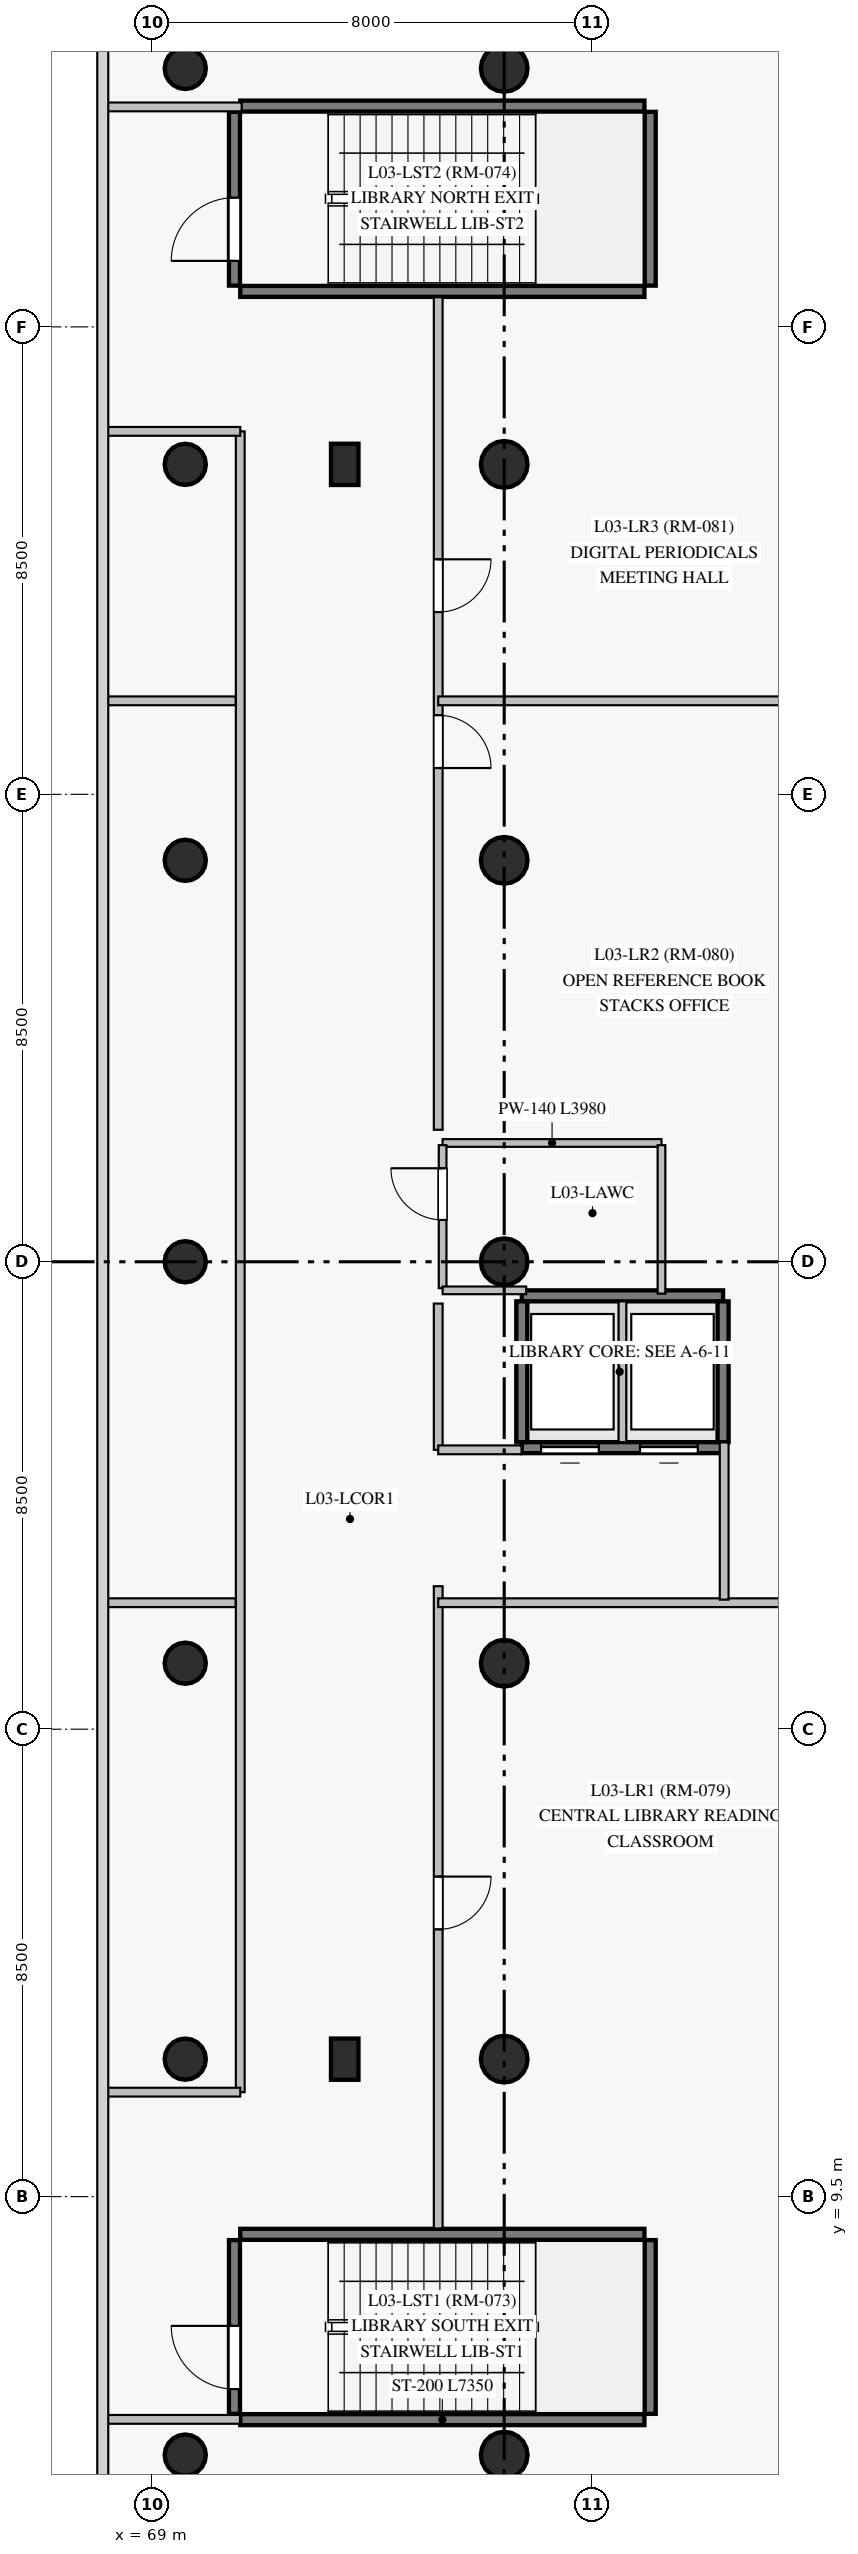
"""IFC4 building model, lengths in metres.
Left out: names, types, materials, properties, quantities, classifications, styles, units other than length and angle.
Written with IfcOpenShell. Run it as: python <this file> out.ifc"""

import sys

from ifc_helpers import new_model, si_unit, direction, frame, frame_2d, origin, origin_with_axes, origin_2d, place, context, subcontext, project, spatial, rectangle, circle, extrude, source, transform, mapped, element, fill, save


model = new_model("IFC4")
c1 = context("Model", 3, precision=1e-05, world=origin(), true_north=direction((0.0, 1.0)))
c2 = subcontext(c1, "Body", "Model", "MODEL_VIEW")
j1 = project(units=[si_unit("LENGTHUNIT", "METRE"), si_unit("PLANEANGLEUNIT", "RADIAN")], contexts=[c1])
p1 = place(None, origin())
s1 = spatial("IfcSite", under=j1, at=p1, CompositionType="ELEMENT")
p2 = place(p1, origin())
s2 = spatial("IfcBuilding", under=s1, at=p2, CompositionType="ELEMENT")
p3 = place(p2, frame((0.0, 0.0, 13.5)))
s3 = spatial("IfcBuildingStorey", under=s2, at=p3, CompositionType="ELEMENT", Elevation=13.5)
m1 = source(origin_with_axes(), c2, "Body", "SweptSolid", [
    extrude(circle(Radius=0.375, at=origin_2d()), origin(), (0.0, 0.0, 1.0), 4.5),
])
for number, where, z_axis, x_axis in (
    (1, (69.6, 4.8, 0.0), (0.0, 0.0, 1.0), (1.0, 0.0, 0.0)),
    (2, (69.6, 12.0, 0.0), (0.0, 0.0, 1.0), (1.0, 0.0, 0.0)),
    (3, (69.6, 19.2, 0.0), (0.0, 0.0, 1.0), (1.0, 0.0, 0.0)),
    (4, (69.6, 26.5, 0.0), (0.0, 0.0, 1.0), (1.0, 0.0, 0.0)),
    (5, (69.6, 33.8, 0.0), (0.0, 0.0, 1.0), (1.0, 0.0, 0.0)),
    (6, (69.6, 41.0, 0.0), (0.0, 0.0, 1.0), (1.0, 0.0, 0.0)),
    (7, (69.6, 48.2, 0.0), (0.0, 0.0, 1.0), (1.0, 0.0, 0.0)),
):
    element("IfcColumn", number, at=place(p3, frame(where, z_axis=z_axis, x_axis=x_axis)), inside=s3, PredefinedType="COLUMN", context=c2, shape_type="MappedRepresentation", body=[
        mapped(m1, transform((0.0, 0.0, 0.0), scale=1.0)),
    ])
m2 = source(origin_with_axes(), c2, "Body", "SweptSolid", [
    extrude(circle(Radius=0.425, at=origin_2d()), origin(), (0.0, 0.0, 1.0), 4.5),
])
for number, where, z_axis, x_axis in (
    (8, (75.4, 4.8, 0.0), (0.0, 0.0, 1.0), (1.0, 0.0, 0.0)),
    (9, (75.4, 12.0, 0.0), (0.0, 0.0, 1.0), (1.0, 0.0, 0.0)),
    (10, (75.4, 19.2, 0.0), (0.0, 0.0, 1.0), (1.0, 0.0, 0.0)),
    (11, (75.4, 26.5, 0.0), (0.0, 0.0, 1.0), (1.0, 0.0, 0.0)),
    (12, (75.4, 33.8, 0.0), (0.0, 0.0, 1.0), (1.0, 0.0, 0.0)),
    (13, (75.4, 41.0, 0.0), (0.0, 0.0, 1.0), (1.0, 0.0, 0.0)),
    (14, (75.4, 48.2, 0.0), (0.0, 0.0, 1.0), (1.0, 0.0, 0.0)),
):
    element("IfcColumn", number, at=place(p3, frame(where, z_axis=z_axis, x_axis=x_axis)), inside=s3, PredefinedType="COLUMN", context=c2, shape_type="MappedRepresentation", body=[
        mapped(m2, transform((0.0, 0.0, 0.0), scale=1.0)),
    ])
m3 = source(origin_with_axes(), c2, "Body", "SweptSolid", [
    extrude(rectangle(XDim=0.5, YDim=0.75, at=origin_2d()), origin(), (0.0, 0.0, 1.0), 4.5),
])
for number, where, z_axis, x_axis in (
    (15, (72.5, 12.0, 0.0), (0.0, 0.0, 1.0), (1.0, 0.0, 0.0)),
    (16, (72.5, 41.0, 0.0), (0.0, 0.0, 1.0), (1.0, 0.0, 0.0)),
):
    element("IfcColumn", number, at=place(p3, frame(where, z_axis=z_axis, x_axis=x_axis)), inside=s3, PredefinedType="PILASTER", context=c2, shape_type="MappedRepresentation", body=[
        mapped(m3, transform((0.0, 0.0, 0.0), scale=1.0)),
    ])
for number, where, z_axis, x_axis in (
    (17, (70.6, 5.445, 0.0), (0.0, 0.0, 1.0), (1.0, 0.0, 0.0)),
    (18, (70.6, 8.815, 0.0), (0.0, 0.0, 1.0), (1.0, 0.0, 0.0)),
    (19, (70.6, 44.145, 0.0), (0.0, 0.0, 1.0), (1.0, 0.0, 0.0)),
    (20, (70.6, 47.515, 0.0), (0.0, 0.0, 1.0), (1.0, 0.0, 0.0)),
):
    element("IfcWall", number, at=place(p3, frame(where, z_axis=z_axis, x_axis=x_axis)), inside=s3, PredefinedType="SHEAR", context=c2, shape_type="SweptSolid", body=[
        extrude(rectangle(XDim=7.35, YDim=0.2, at=frame_2d((3.675, 0.0))), origin(), (0.0, 0.0, 1.0), 4.225),
    ])
p4 = place(p3, frame((75.72, 23.12, 0.0), z_axis=(0.0, 0.0, 1.0), x_axis=(1.0, 0.0, 0.0)))
e21 = element("IfcWall", 21, at=p4, inside=s3, PredefinedType="SHEAR", context=c2, shape_type="SweptSolid", body=[
    extrude(rectangle(XDim=3.66, YDim=0.2, at=frame_2d((1.83, 0.0))), origin(), (0.0, 0.0, 1.0), 4.225),
])
p5 = place(p4, frame((0.35, 0.0, 0.0)))
e22 = element("IfcOpeningElement", 22, at=p5, cuts=e21, PredefinedType="OPENING", context=c2, shape_type="SweptSolid", body=[
    extrude(rectangle(XDim=1.05, YDim=2.15, at=frame_2d((0.525, 1.075))), frame((0.0, 0.11, 0.0), z_axis=(0.0, -1.0, 0.0), x_axis=(1.0, 0.0, 0.0)), (0.0, 0.0, 1.0), 0.22),
])
p6 = place(p4, frame((2.15, 0.0, 0.0)))
e23 = element("IfcOpeningElement", 23, at=p6, cuts=e21, PredefinedType="OPENING", context=c2, shape_type="SweptSolid", body=[
    extrude(rectangle(XDim=1.05, YDim=2.15, at=frame_2d((0.525, 1.075))), frame((0.0, 0.11, 0.0), z_axis=(0.0, -1.0, 0.0), x_axis=(1.0, 0.0, 0.0)), (0.0, 0.0, 1.0), 0.22),
])
p7 = place(p3, frame((75.72, 25.88, 0.0), z_axis=(0.0, 0.0, 1.0), x_axis=(1.0, 0.0, 0.0)))
e24 = element("IfcWall", 24, at=p7, inside=s3, PredefinedType="SHEAR", context=c2, shape_type="SweptSolid", body=[
    extrude(rectangle(XDim=3.66, YDim=0.2, at=frame_2d((1.83, 0.0))), origin(), (0.0, 0.0, 1.0), 4.225),
])
p8 = place(p3, frame((70.495, 5.55, 0.0), z_axis=(0.0, 0.0, 1.0), x_axis=(0.0, 1.0, 0.0)))
e25 = element("IfcWall", 25, at=p8, inside=s3, PredefinedType="SHEAR", context=c2, shape_type="SweptSolid", body=[
    extrude(rectangle(XDim=3.16, YDim=0.2, at=frame_2d((1.58, 0.0))), origin(), (0.0, 0.0, 1.0), 4.225),
])
p9 = place(p8, frame((0.45, 0.0, 0.0)))
e26 = element("IfcOpeningElement", 26, at=p9, cuts=e25, PredefinedType="OPENING", context=c2, shape_type="SweptSolid", body=[
    extrude(rectangle(XDim=1.15, YDim=2.15, at=frame_2d((0.575, 1.075))), frame((0.0, 0.11, 0.0), z_axis=(0.0, -1.0, 0.0), x_axis=(1.0, 0.0, 0.0)), (0.0, 0.0, 1.0), 0.22),
])
p10 = place(p3, frame((78.055, 5.55, 0.0), z_axis=(0.0, 0.0, 1.0), x_axis=(0.0, 1.0, 0.0)))
e27 = element("IfcWall", 27, at=p10, inside=s3, PredefinedType="SHEAR", context=c2, shape_type="SweptSolid", body=[
    extrude(rectangle(XDim=3.16, YDim=0.2, at=frame_2d((1.58, 0.0))), origin(), (0.0, 0.0, 1.0), 4.225),
])
p11 = place(p3, frame((70.495, 44.25, 0.0), z_axis=(0.0, 0.0, 1.0), x_axis=(0.0, 1.0, 0.0)))
e28 = element("IfcWall", 28, at=p11, inside=s3, PredefinedType="SHEAR", context=c2, shape_type="SweptSolid", body=[
    extrude(rectangle(XDim=3.16, YDim=0.2, at=frame_2d((1.58, 0.0))), origin(), (0.0, 0.0, 1.0), 4.225),
])
p12 = place(p11, frame((0.45, 0.0, 0.0)))
e29 = element("IfcOpeningElement", 29, at=p12, cuts=e28, PredefinedType="OPENING", context=c2, shape_type="SweptSolid", body=[
    extrude(rectangle(XDim=1.15, YDim=2.15, at=frame_2d((0.575, 1.075))), frame((0.0, 0.11, 0.0), z_axis=(0.0, -1.0, 0.0), x_axis=(1.0, 0.0, 0.0)), (0.0, 0.0, 1.0), 0.22),
])
p13 = place(p3, frame((78.055, 44.25, 0.0), z_axis=(0.0, 0.0, 1.0), x_axis=(0.0, 1.0, 0.0)))
e30 = element("IfcWall", 30, at=p13, inside=s3, PredefinedType="SHEAR", context=c2, shape_type="SweptSolid", body=[
    extrude(rectangle(XDim=3.16, YDim=0.2, at=frame_2d((1.58, 0.0))), origin(), (0.0, 0.0, 1.0), 4.225),
])
for number, where, z_axis, x_axis in (
    (31, (75.72, 23.22, 0.0), (0.0, 0.0, 1.0), (0.0, 1.0, 0.0)),
    (32, (79.38, 23.22, 0.0), (0.0, 0.0, 1.0), (0.0, 1.0, 0.0)),
):
    element("IfcWall", number, at=place(p3, frame(where, z_axis=z_axis, x_axis=x_axis)), inside=s3, PredefinedType="SHEAR", context=c2, shape_type="SweptSolid", body=[
        extrude(rectangle(XDim=2.56, YDim=0.2, at=frame_2d((1.28, 0.0))), origin(), (0.0, 0.0, 1.0), 4.225),
    ])
p14 = place(p3, frame((70.6, 11.4, 0.0), z_axis=(0.0, 0.0, 1.0), x_axis=(0.0, 1.0, 0.0)))
e33 = element("IfcWall", 33, at=p14, inside=s3, PredefinedType="PARTITIONING", context=c2, shape_type="SweptSolid", body=[
    extrude(rectangle(XDim=30.2, YDim=0.16, at=frame_2d((15.1, 0.0))), origin(), (0.0, 0.0, 1.0), 4.225),
])
p15 = place(p3, frame((74.2, 44.038, 0.0), z_axis=(0.0, 0.0, 1.0), x_axis=(0.0, -1.0, 0.0)))
e34 = element("IfcWall", 34, at=p15, inside=s3, PredefinedType="PARTITIONING", context=c2, shape_type="SweptSolid", body=[
    extrude(rectangle(XDim=15.138, YDim=0.16, at=frame_2d((7.569, 0.0))), origin(), (0.0, 0.0, 1.0), 4.225),
])
p16 = place(p15, frame((7.6, 0.0, 0.0)))
e35 = element("IfcOpeningElement", 35, at=p16, cuts=e34, PredefinedType="OPENING", context=c2, shape_type="SweptSolid", body=[
    extrude(rectangle(XDim=0.96, YDim=2.15, at=frame_2d((0.48, 1.075))), frame((0.0, 0.09, 0.0), z_axis=(0.0, -1.0, 0.0), x_axis=(1.0, 0.0, 0.0)), (0.0, 0.0, 1.0), 0.18),
])
p17 = place(p15, frame((4.764, 0.0, 0.0)))
e36 = element("IfcOpeningElement", 36, at=p17, cuts=e34, PredefinedType="OPENING", context=c2, shape_type="SweptSolid", body=[
    extrude(rectangle(XDim=0.96, YDim=2.15, at=frame_2d((0.48, 1.075))), frame((0.0, 0.09, 0.0), z_axis=(0.0, -1.0, 0.0), x_axis=(1.0, 0.0, 0.0)), (0.0, 0.0, 1.0), 0.18),
])
p18 = place(p3, frame((74.2, 20.6, 0.0), z_axis=(0.0, 0.0, 1.0), x_axis=(0.0, -1.0, 0.0)))
e37 = element("IfcWall", 37, at=p18, inside=s3, PredefinedType="PARTITIONING", context=c2, shape_type="SweptSolid", body=[
    extrude(rectangle(XDim=11.678, YDim=0.16, at=frame_2d((5.839, 0.0))), origin(), (0.0, 0.0, 1.0), 4.225),
])
p19 = place(p18, frame((5.28, 0.0, 0.0)))
e38 = element("IfcOpeningElement", 38, at=p19, cuts=e37, PredefinedType="OPENING", context=c2, shape_type="SweptSolid", body=[
    extrude(rectangle(XDim=0.96, YDim=2.15, at=frame_2d((0.48, 1.075))), frame((0.0, 0.09, 0.0), z_axis=(0.0, -1.0, 0.0), x_axis=(1.0, 0.0, 0.0)), (0.0, 0.0, 1.0), 0.18),
])
for number, where, z_axis, x_axis in (
    (39, (74.2, 20.3, 0.0), (0.0, 0.0, 1.0), (1.0, 0.0, 0.0)),
    (40, (74.2, 36.7, 0.0), (0.0, 0.0, 1.0), (1.0, 0.0, 0.0)),
):
    element("IfcWall", number, at=place(p3, frame(where, z_axis=z_axis, x_axis=x_axis)), inside=s3, PredefinedType="PARTITIONING", context=c2, shape_type="SweptSolid", body=[
        extrude(rectangle(XDim=7.545, YDim=0.16, at=frame_2d((3.772, 0.0))), origin(), (0.0, 0.0, 1.0), 4.225),
    ])
p20 = place(p3, frame((74.28, 28.66, 0.0), z_axis=(0.0, 0.0, 1.0), x_axis=(1.0, 0.0, 0.0)))
e41 = element("IfcWall", 41, at=p20, inside=s3, PredefinedType="PARTITIONING", context=c2, shape_type="SweptSolid", body=[
    extrude(rectangle(XDim=3.98, YDim=0.14, at=frame_2d((1.99, 0.0))), origin(), (0.0, 0.0, 1.0), 4.225),
])
p21 = place(p3, frame((78.26, 25.92, 0.0), z_axis=(0.0, 0.0, 1.0), x_axis=(0.0, 1.0, 0.0)))
e42 = element("IfcWall", 42, at=p21, inside=s3, PredefinedType="PARTITIONING", context=c2, shape_type="SweptSolid", body=[
    extrude(rectangle(XDim=2.7, YDim=0.14, at=frame_2d((1.35, 0.0))), origin(), (0.0, 0.0, 1.0), 4.225),
])
p22 = place(p3, frame((74.2, 25.74, 0.0), z_axis=(0.0, 0.0, 1.0), x_axis=(0.0, -1.0, 0.0)))
e43 = element("IfcWall", 43, at=p22, inside=s3, PredefinedType="PARTITIONING", context=c2, shape_type="SweptSolid", body=[
    extrude(rectangle(XDim=2.66, YDim=0.16, at=frame_2d((1.33, 0.0))), origin(), (0.0, 0.0, 1.0), 4.225),
])
p23 = place(p3, frame((74.28, 26.02, 0.0), z_axis=(0.0, 0.0, 1.0), x_axis=(0.0, 1.0, 0.0)))
e44 = element("IfcWall", 44, at=p23, inside=s3, PredefinedType="PARTITIONING", context=c2, shape_type="SweptSolid", body=[
    extrude(rectangle(XDim=2.6, YDim=0.14, at=frame_2d((1.3, 0.0))), origin(), (0.0, 0.0, 1.0), 4.225),
])
p24 = place(p23, frame((1.24, 0.0, 0.0)))
e45 = element("IfcOpeningElement", 45, at=p24, cuts=e44, PredefinedType="OPENING", context=c2, shape_type="SweptSolid", body=[
    extrude(rectangle(XDim=0.94, YDim=2.1, at=frame_2d((0.47, 1.05))), frame((0.0, 0.08, 0.0), z_axis=(0.0, -1.0, 0.0), x_axis=(1.0, 0.0, 0.0)), (0.0, 0.0, 1.0), 0.16),
])
p25 = place(p3, frame((77.55, 23.22, 0.0), z_axis=(0.0, 0.0, 1.0), x_axis=(0.0, 1.0, 0.0)))
e46 = element("IfcWall", 46, at=p25, inside=s3, PredefinedType="PARTITIONING", context=c2, shape_type="SweptSolid", body=[
    extrude(rectangle(XDim=2.56, YDim=0.14, at=frame_2d((1.28, 0.0))), origin(), (0.0, 0.0, 1.0), 4.225),
])
for number, where, z_axis, x_axis in (
    (47, (68.155, 20.3, 0.0), (0.0, 0.0, 1.0), (1.0, 0.0, 0.0)),
    (48, (68.155, 36.7, 0.0), (0.0, 0.0, 1.0), (1.0, 0.0, 0.0)),
):
    element("IfcWall", number, at=place(p3, frame(where, z_axis=z_axis, x_axis=x_axis)), inside=s3, PredefinedType="PARTITIONING", context=c2, shape_type="SweptSolid", body=[
        extrude(rectangle(XDim=2.36, YDim=0.16, at=frame_2d((1.18, 0.0))), origin(), (0.0, 0.0, 1.0), 4.225),
    ])
p26 = place(p3, frame((79.4, 23.215, 0.0), z_axis=(0.0, 0.0, 1.0), x_axis=(0.0, -1.0, 0.0)))
e49 = element("IfcWall", 49, at=p26, inside=s3, PredefinedType="PARTITIONING", context=c2, shape_type="SweptSolid", body=[
    extrude(rectangle(XDim=2.859, YDim=0.16, at=frame_2d((1.43, 0.0))), origin(), (0.0, 0.0, 1.0), 4.225),
])
for number, where, z_axis, x_axis in (
    (50, (70.6, 41.6, 0.0), (0.0, 0.0, 1.0), (-1.0, 0.0, 0.0)),
    (51, (68.185, 11.4, 0.0), (0.0, 0.0, 1.0), (1.0, 0.0, 0.0)),
):
    element("IfcWall", number, at=place(p3, frame(where, z_axis=z_axis, x_axis=x_axis)), inside=s3, PredefinedType="PARTITIONING", context=c2, shape_type="SweptSolid", body=[
        extrude(rectangle(XDim=2.415, YDim=0.16, at=frame_2d((1.208, 0.0))), origin(), (0.0, 0.0, 1.0), 3.575),
    ])
p27 = place(p3, frame((68.185, 47.5, 0.0), z_axis=(0.0, 0.0, 1.0), x_axis=(1.0, 0.0, 0.0)))
e52 = element("IfcWall", 52, at=p27, inside=s3, PredefinedType="PARTITIONING", context=c2, shape_type="SweptSolid", body=[
    extrude(rectangle(XDim=2.441, YDim=0.16, at=frame_2d((1.22, 0.0))), origin(), (0.0, 0.0, 1.0), 4.225),
])
p28 = place(p3, frame((70.595, 5.45, 0.0), z_axis=(0.0, 0.0, 1.0), x_axis=(-1.0, 0.0, 0.0)))
e53 = element("IfcWall", 53, at=p28, inside=s3, PredefinedType="PARTITIONING", context=c2, shape_type="SweptSolid", body=[
    extrude(rectangle(XDim=2.441, YDim=0.16, at=frame_2d((1.22, 0.0))), origin(), (0.0, 0.0, 1.0), 3.575),
])
p29 = place(p3, frame((74.28, 25.98, 0.0), z_axis=(0.0, 0.0, 1.0), x_axis=(1.0, 0.0, 0.0)))
e54 = element("IfcWall", 54, at=p29, inside=s3, PredefinedType="PARTITIONING", context=c2, shape_type="SweptSolid", body=[
    extrude(rectangle(XDim=1.52, YDim=0.14, at=frame_2d((0.76, 0.0))), origin(), (0.0, 0.0, 1.0), 3.575),
])
p30 = place(p3, frame((74.2, 23.08, 0.0), z_axis=(0.0, 0.0, 1.0), x_axis=(1.0, 0.0, 0.0)))
e55 = element("IfcWall", 55, at=p30, inside=s3, PredefinedType="PARTITIONING", context=c2, shape_type="SweptSolid", body=[
    extrude(rectangle(XDim=1.515, YDim=0.16, at=frame_2d((0.758, 0.0))), origin(), (0.0, 0.0, 1.0), 3.725),
])
m4 = source(origin_with_axes(), c2, "Body", "SweptSolid", [
    extrude(rectangle(XDim=1.15, YDim=2.15, at=frame_2d((0.575, 1.075))), frame((0.0, 0.025, 0.0), z_axis=(0.0, -1.0, 0.0), x_axis=(1.0, 0.0, 0.0)), (0.0, 0.0, 1.0), 0.05),
])
p31 = place(p9, origin())
e56 = element("IfcDoor", 56, at=p31, inside=s3, OperationType="SINGLE_SWING_RIGHT", PredefinedType="DOOR", context=c2, shape_type="MappedRepresentation", body=[
    mapped(m4, transform((0.0, 0.0, 0.0), scale=1.0)),
])
fill(e26, e56)
p32 = place(p12, origin())
e57 = element("IfcDoor", 57, at=p32, inside=s3, OperationType="SINGLE_SWING_LEFT", PredefinedType="DOOR", context=c2, shape_type="MappedRepresentation", body=[
    mapped(m4, transform((0.0, 0.0, 0.0), scale=1.0)),
])
fill(e29, e57)
m5 = source(origin_with_axes(), c2, "Body", "SweptSolid", [
    extrude(rectangle(XDim=1.05, YDim=2.15, at=frame_2d((0.525, 1.075))), frame((0.0, 0.025, 0.0), z_axis=(0.0, -1.0, 0.0), x_axis=(1.0, 0.0, 0.0)), (0.0, 0.0, 1.0), 0.05),
])
p33 = place(p5, origin())
e58 = element("IfcDoor", 58, at=p33, inside=s3, OperationType="SLIDING_TO_LEFT", PredefinedType="DOOR", context=c2, shape_type="MappedRepresentation", body=[
    mapped(m5, transform((0.0, 0.0, 0.0), scale=1.0)),
])
fill(e22, e58)
p34 = place(p6, origin())
e59 = element("IfcDoor", 59, at=p34, inside=s3, OperationType="SLIDING_TO_RIGHT", PredefinedType="DOOR", context=c2, shape_type="MappedRepresentation", body=[
    mapped(m5, transform((0.0, 0.0, 0.0), scale=1.0)),
])
fill(e23, e59)
m6 = source(origin_with_axes(), c2, "Body", "SweptSolid", [
    extrude(rectangle(XDim=0.94, YDim=2.1, at=frame_2d((0.47, 1.05))), frame((0.0, 0.025, 0.0), z_axis=(0.0, -1.0, 0.0), x_axis=(1.0, 0.0, 0.0)), (0.0, 0.0, 1.0), 0.05),
])
p35 = place(p24, origin())
e60 = element("IfcDoor", 60, at=p35, inside=s3, OperationType="SINGLE_SWING_RIGHT", PredefinedType="DOOR", context=c2, shape_type="MappedRepresentation", body=[
    mapped(m6, transform((0.0, 0.0, 0.0), scale=1.0)),
])
fill(e45, e60)
m7 = source(origin_with_axes(), c2, "Body", "SweptSolid", [
    extrude(rectangle(XDim=0.96, YDim=2.15, at=frame_2d((0.48, 1.075))), frame((0.0, 0.025, 0.0), z_axis=(0.0, -1.0, 0.0), x_axis=(1.0, 0.0, 0.0)), (0.0, 0.0, 1.0), 0.05),
])
p36 = place(p19, origin())
e61 = element("IfcDoor", 61, at=p36, inside=s3, OperationType="SINGLE_SWING_LEFT", PredefinedType="DOOR", context=c2, shape_type="MappedRepresentation", body=[
    mapped(m7, transform((0.0, 0.0, 0.0), scale=1.0)),
])
fill(e38, e61)
p37 = place(p16, origin())
e62 = element("IfcDoor", 62, at=p37, inside=s3, OperationType="SINGLE_SWING_RIGHT", PredefinedType="DOOR", context=c2, shape_type="MappedRepresentation", body=[
    mapped(m7, transform((0.0, 0.0, 0.0), scale=1.0)),
])
fill(e35, e62)
p38 = place(p17, origin())
e63 = element("IfcDoor", 63, at=p38, inside=s3, OperationType="SINGLE_SWING_LEFT", PredefinedType="DOOR", context=c2, shape_type="MappedRepresentation", body=[
    mapped(m7, transform((0.0, 0.0, 0.0), scale=1.0)),
])
fill(e36, e63)
save(model, sys.argv[1])
